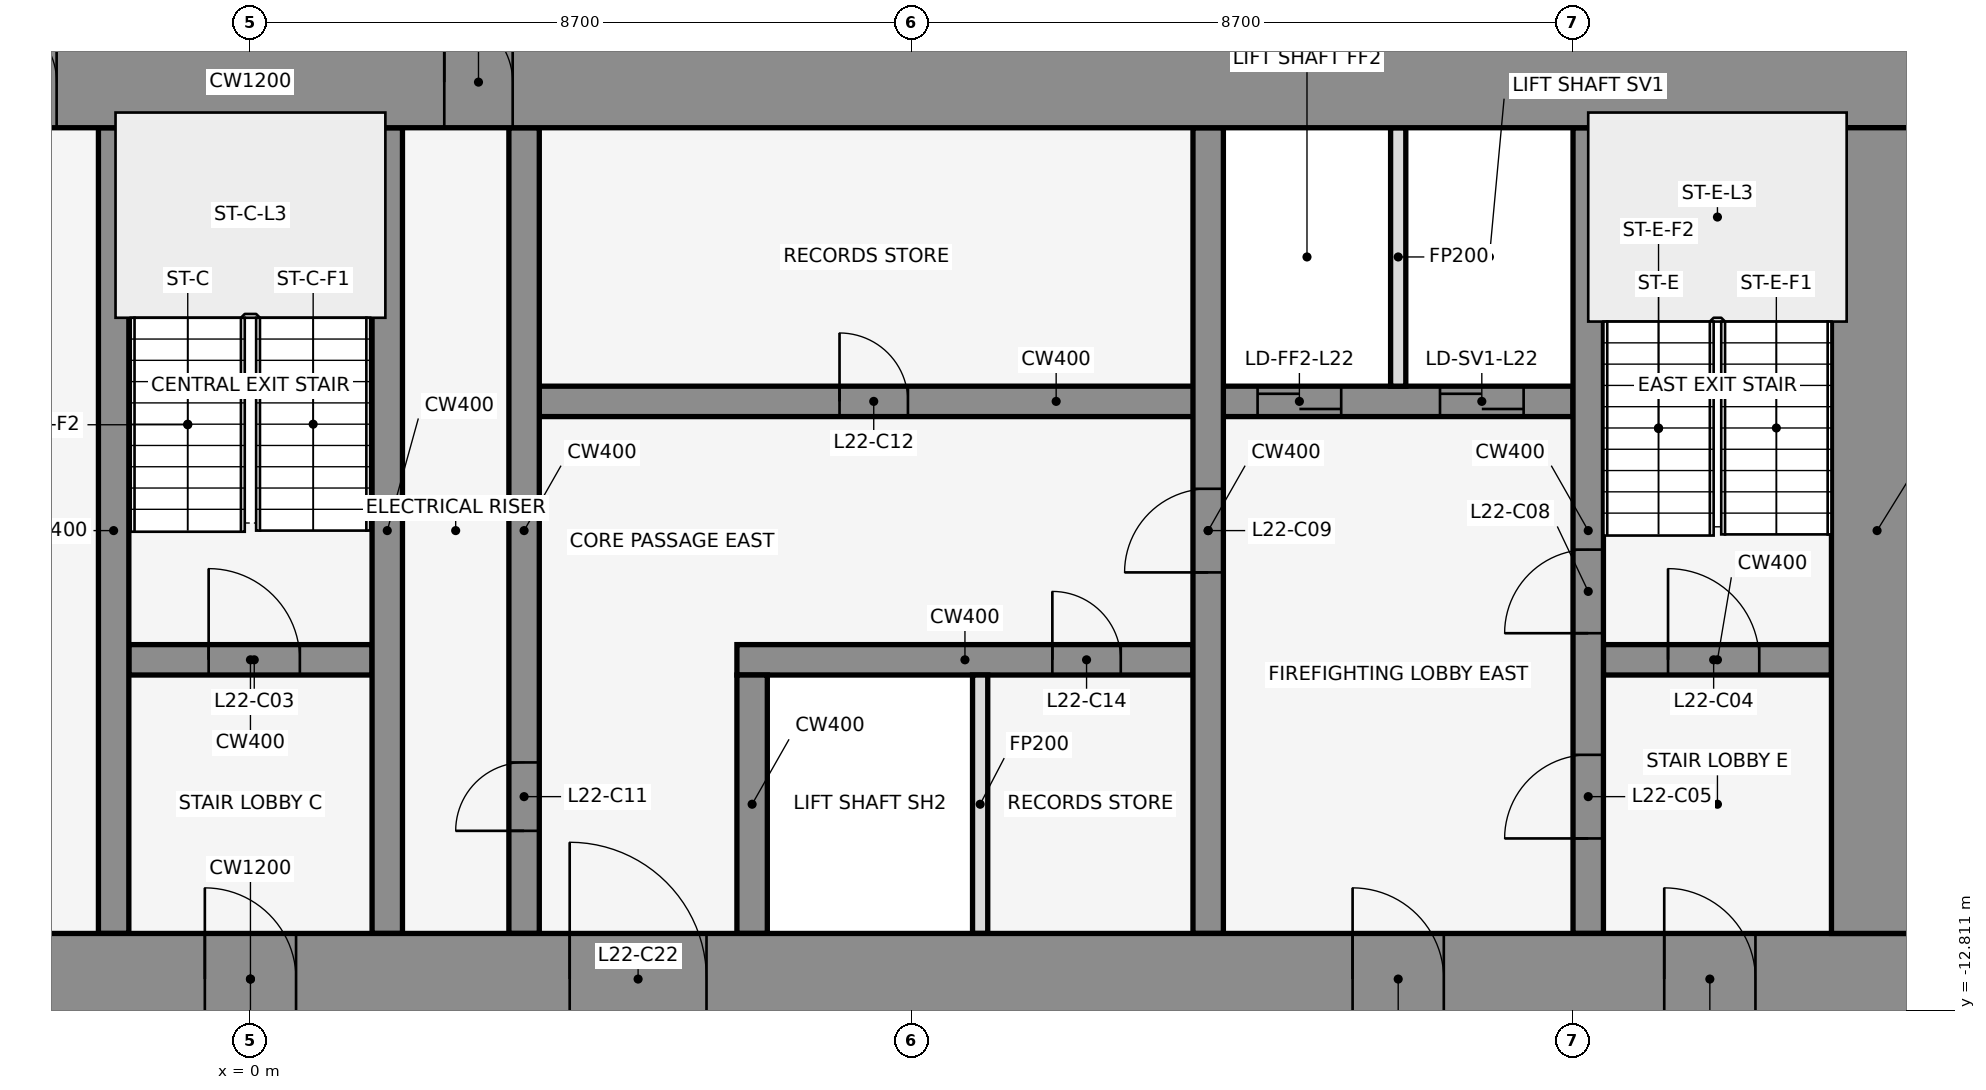
"""IFC4 building model, lengths in metres.
Left out: names, types, materials, properties, quantities, classifications, styles, units other than length and angle.
Written with IfcOpenShell. Run it as: python <this file> out.ifc"""

import sys

from ifc_helpers import new_model, si_unit, direction, frame, frame_2d, origin, place, context, subcontext, project, spatial, rectangle, extrude, element, fill, save


model = new_model("IFC4")
c1 = context("Model", 3, precision=1e-05, world=origin(), true_north=direction((0.0, 1.0)))
c2 = subcontext(c1, "Body", "Model", "MODEL_VIEW")
j1 = project(units=[si_unit("LENGTHUNIT", "METRE"), si_unit("PLANEANGLEUNIT", "RADIAN")], contexts=[c1])
p1 = place(None, origin())
s1 = spatial("IfcSite", under=j1, at=p1, CompositionType="ELEMENT")
p2 = place(p1, origin())
s2 = spatial("IfcBuilding", under=s1, at=p2, CompositionType="ELEMENT")
p3 = place(p2, frame((0.0, 0.0, 106.3)))
s3 = spatial("IfcBuildingStorey", under=s2, at=p3, CompositionType="ELEMENT", Elevation=106.3)
for number, where, z_axis, x_axis in (
    (1, (16.432, -0.105, 0.0), (0.0, 0.0, 1.0), (-0.84, 0.543, 0.0)),
    (2, (1.901, 1.08, 0.0), (0.0, 0.0, 1.0), (-0.84, -0.543, 0.0)),
    (3, (-0.068, -0.105, 0.0), (0.0, 0.0, 1.0), (-0.84, 0.543, 0.0)),
):
    element("IfcWall", number, at=place(p3, frame(where, z_axis=z_axis, x_axis=x_axis)), inside=s3, PredefinedType="STANDARD", context=c2, shape_type="SweptSolid", body=[
        extrude(rectangle(XDim=2.183, YDim=0.25, at=frame_2d((1.091, 0.0))), origin(), (0.0, 0.0, 1.0), 3.95),
    ])
p4 = place(p3, frame((-1.6, -8.2, 0.0), z_axis=(0.0, 0.0, 1.0), x_axis=(1.0, 0.0, 0.0)))
e4 = element("IfcWall", 4, at=p4, inside=s3, PredefinedType="SHEAR", context=c2, shape_type="SweptSolid", body=[
    extrude(rectangle(XDim=3.2, YDim=0.4, at=frame_2d((1.6, 0.0))), origin(), (0.0, 0.0, 1.0), 4.1),
])
p5 = place(p4, frame((1.05, 0.0, 0.0)))
e5 = element("IfcOpeningElement", 5, at=p5, cuts=e4, PredefinedType="OPENING", context=c2, shape_type="SweptSolid", body=[
    extrude(rectangle(XDim=1.2, YDim=2.1, at=frame_2d((0.6, 1.05))), frame((0.0, 0.212, 0.0), z_axis=(0.0, -1.0, 0.0), x_axis=(1.0, 0.0, 0.0)), (0.0, 0.0, 1.0), 0.424),
])
p6 = place(p3, frame((6.4, -8.2, 0.0), z_axis=(0.0, 0.0, 1.0), x_axis=(1.0, 0.0, 0.0)))
e6 = element("IfcWall", 6, at=p6, inside=s3, PredefinedType="SHEAR", context=c2, shape_type="SweptSolid", body=[
    extrude(rectangle(XDim=6.0, YDim=0.4, at=frame_2d((3.0, 0.0))), origin(), (0.0, 0.0, 1.0), 4.1),
])
p7 = place(p6, frame((4.15, 0.0, 0.0)))
e7 = element("IfcOpeningElement", 7, at=p7, cuts=e6, PredefinedType="OPENING", context=c2, shape_type="SweptSolid", body=[
    extrude(rectangle(XDim=0.9, YDim=2.1, at=frame_2d((0.45, 1.05))), frame((0.0, 0.212, 0.0), z_axis=(0.0, -1.0, 0.0), x_axis=(1.0, 0.0, 0.0)), (0.0, 0.0, 1.0), 0.424),
])
p8 = place(p3, frame((17.8, -8.2, 0.0), z_axis=(0.0, 0.0, 1.0), x_axis=(1.0, 0.0, 0.0)))
e8 = element("IfcWall", 8, at=p8, inside=s3, PredefinedType="SHEAR", context=c2, shape_type="SweptSolid", body=[
    extrude(rectangle(XDim=3.0, YDim=0.4, at=frame_2d((1.5, 0.0))), origin(), (0.0, 0.0, 1.0), 4.1),
])
p9 = place(p8, frame((0.85, 0.0, 0.0)))
e9 = element("IfcOpeningElement", 9, at=p9, cuts=e8, PredefinedType="OPENING", context=c2, shape_type="SweptSolid", body=[
    extrude(rectangle(XDim=1.2, YDim=2.1, at=frame_2d((0.6, 1.05))), frame((0.0, 0.212, 0.0), z_axis=(0.0, -1.0, 0.0), x_axis=(1.0, 0.0, 0.0)), (0.0, 0.0, 1.0), 0.424),
])
p10 = place(p3, frame((3.8, -4.8, 0.0), z_axis=(0.0, 0.0, 1.0), x_axis=(1.0, 0.0, 0.0)))
e10 = element("IfcWall", 10, at=p10, inside=s3, PredefinedType="SHEAR", context=c2, shape_type="SweptSolid", body=[
    extrude(rectangle(XDim=13.6, YDim=0.4, at=frame_2d((6.8, 0.0))), origin(), (0.0, 0.0, 1.0), 4.1),
])
p11 = place(p10, frame((9.45, 0.0, 0.0)))
e11 = element("IfcOpeningElement", 11, at=p11, cuts=e10, PredefinedType="OPENING", context=c2, shape_type="SweptSolid", body=[
    extrude(rectangle(XDim=1.1, YDim=2.1, at=frame_2d((0.55, 1.05))), frame((0.0, 0.212, 0.0), z_axis=(0.0, -1.0, 0.0), x_axis=(1.0, 0.0, 0.0)), (0.0, 0.0, 1.0), 0.424),
])
p12 = place(p10, frame((11.85, 0.0, 0.0)))
e12 = element("IfcOpeningElement", 12, at=p12, cuts=e10, PredefinedType="OPENING", context=c2, shape_type="SweptSolid", body=[
    extrude(rectangle(XDim=1.1, YDim=2.1, at=frame_2d((0.55, 1.05))), frame((0.0, 0.212, 0.0), z_axis=(0.0, -1.0, 0.0), x_axis=(1.0, 0.0, 0.0)), (0.0, 0.0, 1.0), 0.424),
])
p13 = place(p10, frame((3.95, 0.0, 0.0)))
e13 = element("IfcOpeningElement", 13, at=p13, cuts=e10, PredefinedType="OPENING", context=c2, shape_type="SweptSolid", body=[
    extrude(rectangle(XDim=0.9, YDim=2.1, at=frame_2d((0.45, 1.05))), frame((0.0, 0.212, 0.0), z_axis=(0.0, -1.0, 0.0), x_axis=(1.0, 0.0, 0.0)), (0.0, 0.0, 1.0), 0.424),
])
for number, where, z_axis, x_axis in (
    (14, (-1.8, -11.8, 0.0), (0.0, 0.0, 1.0), (0.0, 1.0, 0.0)),
    (15, (1.8, -11.8, 0.0), (0.0, 0.0, 1.0), (0.0, 1.0, 0.0)),
):
    element("IfcWall", number, at=place(p3, frame(where, z_axis=z_axis, x_axis=x_axis)), inside=s3, PredefinedType="SHEAR", context=c2, shape_type="SweptSolid", body=[
        extrude(rectangle(XDim=10.6, YDim=0.4, at=frame_2d((5.3, 0.0))), origin(), (0.0, 0.0, 1.0), 4.1),
    ])
p14 = place(p3, frame((3.6, -11.8, 0.0), z_axis=(0.0, 0.0, 1.0), x_axis=(0.0, 1.0, 0.0)))
e16 = element("IfcWall", 16, at=p14, inside=s3, PredefinedType="SHEAR", context=c2, shape_type="SweptSolid", body=[
    extrude(rectangle(XDim=10.6, YDim=0.4, at=frame_2d((5.3, 0.0))), origin(), (0.0, 0.0, 1.0), 4.1),
])
p15 = place(p14, frame((1.35, 0.0, 0.0)))
e17 = element("IfcOpeningElement", 17, at=p15, cuts=e16, PredefinedType="OPENING", context=c2, shape_type="SweptSolid", body=[
    extrude(rectangle(XDim=0.9, YDim=2.1, at=frame_2d((0.45, 1.05))), frame((0.0, 0.212, 0.0), z_axis=(0.0, -1.0, 0.0), x_axis=(1.0, 0.0, 0.0)), (0.0, 0.0, 1.0), 0.424),
])
p16 = place(p3, frame((6.6, -11.8, 0.0), z_axis=(0.0, 0.0, 1.0), x_axis=(0.0, 1.0, 0.0)))
e18 = element("IfcWall", 18, at=p16, inside=s3, PredefinedType="SHEAR", context=c2, shape_type="SweptSolid", body=[
    extrude(rectangle(XDim=3.4, YDim=0.4, at=frame_2d((1.7, 0.0))), origin(), (0.0, 0.0, 1.0), 4.1),
])
p17 = place(p3, frame((9.6, -11.8, 0.0), z_axis=(0.0, 0.0, 1.0), x_axis=(0.0, 1.0, 0.0)))
e19 = element("IfcWall", 19, at=p17, inside=s3, PredefinedType="PARTITIONING", context=c2, shape_type="SweptSolid", body=[
    extrude(rectangle(XDim=3.4, YDim=0.2, at=frame_2d((1.7, 0.0))), origin(), (0.0, 0.0, 1.0), 3.018),
])
p18 = place(p3, frame((12.6, -11.8, 0.0), z_axis=(0.0, 0.0, 1.0), x_axis=(0.0, 1.0, 0.0)))
e20 = element("IfcWall", 20, at=p18, inside=s3, PredefinedType="SHEAR", context=c2, shape_type="SweptSolid", body=[
    extrude(rectangle(XDim=10.6, YDim=0.4, at=frame_2d((5.3, 0.0))), origin(), (0.0, 0.0, 1.0), 4.1),
])
p19 = place(p18, frame((4.75, 0.0, 0.0)))
e21 = element("IfcOpeningElement", 21, at=p19, cuts=e20, PredefinedType="OPENING", context=c2, shape_type="SweptSolid", body=[
    extrude(rectangle(XDim=1.1, YDim=2.1, at=frame_2d((0.55, 1.05))), frame((0.0, 0.212, 0.0), z_axis=(0.0, -1.0, 0.0), x_axis=(1.0, 0.0, 0.0)), (0.0, 0.0, 1.0), 0.424),
])
p20 = place(p3, frame((15.1, -4.6, 0.0), z_axis=(0.0, 0.0, 1.0), x_axis=(0.0, 1.0, 0.0)))
e22 = element("IfcWall", 22, at=p20, inside=s3, PredefinedType="PARTITIONING", context=c2, shape_type="SweptSolid", body=[
    extrude(rectangle(XDim=3.4, YDim=0.2, at=frame_2d((1.7, 0.0))), origin(), (0.0, 0.0, 1.0), 3.018),
])
p21 = place(p3, frame((17.6, -11.8, 0.0), z_axis=(0.0, 0.0, 1.0), x_axis=(0.0, 1.0, 0.0)))
e23 = element("IfcWall", 23, at=p21, inside=s3, PredefinedType="SHEAR", context=c2, shape_type="SweptSolid", body=[
    extrude(rectangle(XDim=10.6, YDim=0.4, at=frame_2d((5.3, 0.0))), origin(), (0.0, 0.0, 1.0), 4.1),
])
p22 = place(p21, frame((1.25, 0.0, 0.0)))
e24 = element("IfcOpeningElement", 24, at=p22, cuts=e23, PredefinedType="OPENING", context=c2, shape_type="SweptSolid", body=[
    extrude(rectangle(XDim=1.1, YDim=2.1, at=frame_2d((0.55, 1.05))), frame((0.0, 0.212, 0.0), z_axis=(0.0, -1.0, 0.0), x_axis=(1.0, 0.0, 0.0)), (0.0, 0.0, 1.0), 0.424),
])
p23 = place(p21, frame((3.95, 0.0, 0.0)))
e25 = element("IfcOpeningElement", 25, at=p23, cuts=e23, PredefinedType="OPENING", context=c2, shape_type="SweptSolid", body=[
    extrude(rectangle(XDim=1.1, YDim=2.1, at=frame_2d((0.55, 1.05))), frame((0.0, 0.212, 0.0), z_axis=(0.0, -1.0, 0.0), x_axis=(1.0, 0.0, 0.0)), (0.0, 0.0, 1.0), 0.424),
])
p24 = place(p3, frame((-22.0, -0.6, 0.0), z_axis=(0.0, 0.0, 1.0), x_axis=(1.0, 0.0, 0.0)))
e26 = element("IfcWall", 26, at=p24, inside=s3, PredefinedType="SHEAR", context=c2, shape_type="SweptSolid", body=[
    extrude(rectangle(XDim=44.0, YDim=1.2, at=frame_2d((22.0, 0.0))), origin(), (0.0, 0.0, 1.0), 4.1),
])
p25 = place(p24, frame((18.55, 0.0, 0.0)))
e27 = element("IfcOpeningElement", 27, at=p25, cuts=e26, PredefinedType="OPENING", context=c2, shape_type="SweptSolid", body=[
    extrude(rectangle(XDim=0.9, YDim=2.1, at=frame_2d((0.45, 1.05))), frame((0.0, 0.612, 0.0), z_axis=(0.0, -1.0, 0.0), x_axis=(1.0, 0.0, 0.0)), (0.0, 0.0, 1.0), 1.224),
])
p26 = place(p24, frame((24.55, 0.0, 0.0)))
e28 = element("IfcOpeningElement", 28, at=p26, cuts=e26, PredefinedType="OPENING", context=c2, shape_type="SweptSolid", body=[
    extrude(rectangle(XDim=0.9, YDim=2.1, at=frame_2d((0.45, 1.05))), frame((0.0, 0.612, 0.0), z_axis=(0.0, -1.0, 0.0), x_axis=(1.0, 0.0, 0.0)), (0.0, 0.0, 1.0), 1.224),
])
p27 = place(p3, frame((-22.0, -12.4, 0.0), z_axis=(0.0, 0.0, 1.0), x_axis=(1.0, 0.0, 0.0)))
e29 = element("IfcWall", 29, at=p27, inside=s3, PredefinedType="SHEAR", context=c2, shape_type="SweptSolid", body=[
    extrude(rectangle(XDim=44.0, YDim=1.2, at=frame_2d((22.0, 0.0))), origin(), (0.0, 0.0, 1.0), 4.1),
])
p28 = place(p27, frame((2.2, 0.0, 0.0)))
e30 = element("IfcOpeningElement", 30, at=p28, cuts=e29, PredefinedType="OPENING", context=c2, shape_type="SweptSolid", body=[
    extrude(rectangle(XDim=1.2, YDim=2.1, at=frame_2d((0.6, 1.05))), frame((0.0, 0.612, 0.0), z_axis=(0.0, -1.0, 0.0), x_axis=(1.0, 0.0, 0.0)), (0.0, 0.0, 1.0), 1.224),
])
p29 = place(p27, frame((21.4, 0.0, 0.0)))
e31 = element("IfcOpeningElement", 31, at=p29, cuts=e29, PredefinedType="OPENING", context=c2, shape_type="SweptSolid", body=[
    extrude(rectangle(XDim=1.2, YDim=2.1, at=frame_2d((0.6, 1.05))), frame((0.0, 0.612, 0.0), z_axis=(0.0, -1.0, 0.0), x_axis=(1.0, 0.0, 0.0)), (0.0, 0.0, 1.0), 1.224),
])
p30 = place(p27, frame((40.6, 0.0, 0.0)))
e32 = element("IfcOpeningElement", 32, at=p30, cuts=e29, PredefinedType="OPENING", context=c2, shape_type="SweptSolid", body=[
    extrude(rectangle(XDim=1.2, YDim=2.1, at=frame_2d((0.6, 1.05))), frame((0.0, 0.612, 0.0), z_axis=(0.0, -1.0, 0.0), x_axis=(1.0, 0.0, 0.0)), (0.0, 0.0, 1.0), 1.224),
])
p31 = place(p27, frame((16.0, 0.0, 0.0)))
e33 = element("IfcOpeningElement", 33, at=p31, cuts=e29, PredefinedType="OPENING", context=c2, shape_type="SweptSolid", body=[
    extrude(rectangle(XDim=1.8, YDim=2.1, at=frame_2d((0.9, 1.05))), frame((0.0, 0.612, 0.0), z_axis=(0.0, -1.0, 0.0), x_axis=(1.0, 0.0, 0.0)), (0.0, 0.0, 1.0), 1.224),
])
p32 = place(p27, frame((6.3, 0.0, 0.0)))
e34 = element("IfcOpeningElement", 34, at=p32, cuts=e29, PredefinedType="OPENING", context=c2, shape_type="SweptSolid", body=[
    extrude(rectangle(XDim=1.2, YDim=2.1, at=frame_2d((0.6, 1.05))), frame((0.0, 0.612, 0.0), z_axis=(0.0, -1.0, 0.0), x_axis=(1.0, 0.0, 0.0)), (0.0, 0.0, 1.0), 1.224),
])
p33 = place(p27, frame((26.2, 0.0, 0.0)))
e35 = element("IfcOpeningElement", 35, at=p33, cuts=e29, PredefinedType="OPENING", context=c2, shape_type="SweptSolid", body=[
    extrude(rectangle(XDim=1.8, YDim=2.1, at=frame_2d((0.9, 1.05))), frame((0.0, 0.612, 0.0), z_axis=(0.0, -1.0, 0.0), x_axis=(1.0, 0.0, 0.0)), (0.0, 0.0, 1.0), 1.224),
])
p34 = place(p27, frame((36.5, 0.0, 0.0)))
e36 = element("IfcOpeningElement", 36, at=p34, cuts=e29, PredefinedType="OPENING", context=c2, shape_type="SweptSolid", body=[
    extrude(rectangle(XDim=1.2, YDim=2.1, at=frame_2d((0.6, 1.05))), frame((0.0, 0.612, 0.0), z_axis=(0.0, -1.0, 0.0), x_axis=(1.0, 0.0, 0.0)), (0.0, 0.0, 1.0), 1.224),
])
p35 = place(p3, frame((21.4, -11.8, 0.0), z_axis=(0.0, 0.0, 1.0), x_axis=(0.0, 1.0, 0.0)))
e37 = element("IfcWall", 37, at=p35, inside=s3, PredefinedType="SHEAR", context=c2, shape_type="SweptSolid", body=[
    extrude(rectangle(XDim=10.6, YDim=1.2, at=frame_2d((5.3, 0.0))), origin(), (0.0, 0.0, 1.0), 4.1),
])
p36 = place(p5, origin())
e38 = element("IfcDoor", 38, at=p36, inside=s3, OperationType="SINGLE_SWING_LEFT", PredefinedType="DOOR", context=c2, shape_type="SweptSolid", body=[
    extrude(rectangle(XDim=1.2, YDim=2.1, at=frame_2d((0.6, 1.05))), frame((0.0, 0.025, 0.0), z_axis=(0.0, -1.0, 0.0), x_axis=(1.0, 0.0, 0.0)), (0.0, 0.0, 1.0), 0.05),
])
fill(e5, e38)
p37 = place(p9, origin())
e39 = element("IfcDoor", 39, at=p37, inside=s3, OperationType="SINGLE_SWING_RIGHT", PredefinedType="DOOR", context=c2, shape_type="SweptSolid", body=[
    extrude(rectangle(XDim=1.2, YDim=2.1, at=frame_2d((0.6, 1.05))), frame((0.0, 0.025, 0.0), z_axis=(0.0, -1.0, 0.0), x_axis=(1.0, 0.0, 0.0)), (0.0, 0.0, 1.0), 0.05),
])
fill(e9, e39)
p38 = place(p22, origin())
e40 = element("IfcDoor", 40, at=p38, inside=s3, OperationType="SINGLE_SWING_LEFT", PredefinedType="DOOR", context=c2, shape_type="SweptSolid", body=[
    extrude(rectangle(XDim=1.1, YDim=2.1, at=frame_2d((0.55, 1.05))), frame((0.0, 0.025, 0.0), z_axis=(0.0, -1.0, 0.0), x_axis=(1.0, 0.0, 0.0)), (0.0, 0.0, 1.0), 0.05),
])
fill(e24, e40)
p39 = place(p11, origin())
e41 = element("IfcDoor", 41, at=p39, inside=s3, OperationType="DOUBLE_DOOR_SLIDING", PredefinedType="DOOR", context=c2, shape_type="SweptSolid", body=[
    extrude(rectangle(XDim=1.1, YDim=2.1, at=frame_2d((0.55, 1.05))), frame((0.0, 0.025, 0.0), z_axis=(0.0, -1.0, 0.0), x_axis=(1.0, 0.0, 0.0)), (0.0, 0.0, 1.0), 0.05),
])
fill(e11, e41)
p40 = place(p12, origin())
e42 = element("IfcDoor", 42, at=p40, inside=s3, OperationType="DOUBLE_DOOR_SLIDING", PredefinedType="DOOR", context=c2, shape_type="SweptSolid", body=[
    extrude(rectangle(XDim=1.1, YDim=2.1, at=frame_2d((0.55, 1.05))), frame((0.0, 0.025, 0.0), z_axis=(0.0, -1.0, 0.0), x_axis=(1.0, 0.0, 0.0)), (0.0, 0.0, 1.0), 0.05),
])
fill(e12, e42)
p41 = place(p23, origin())
e43 = element("IfcDoor", 43, at=p41, inside=s3, OperationType="SINGLE_SWING_RIGHT", PredefinedType="DOOR", context=c2, shape_type="SweptSolid", body=[
    extrude(rectangle(XDim=1.1, YDim=2.1, at=frame_2d((0.55, 1.05))), frame((0.0, 0.025, 0.0), z_axis=(0.0, -1.0, 0.0), x_axis=(1.0, 0.0, 0.0)), (0.0, 0.0, 1.0), 0.05),
])
fill(e25, e43)
p42 = place(p19, frame((1.1, 0.0, 0.0), z_axis=(0.0, 0.0, 1.0), x_axis=(-1.0, 0.0, 0.0)))
e44 = element("IfcDoor", 44, at=p42, inside=s3, OperationType="SINGLE_SWING_RIGHT", PredefinedType="DOOR", context=c2, shape_type="SweptSolid", body=[
    extrude(rectangle(XDim=1.1, YDim=2.1, at=frame_2d((0.55, 1.05))), frame((0.0, 0.025, 0.0), z_axis=(0.0, -1.0, 0.0), x_axis=(1.0, 0.0, 0.0)), (0.0, 0.0, 1.0), 0.05),
])
fill(e21, e44)
p43 = place(p15, origin())
e45 = element("IfcDoor", 45, at=p43, inside=s3, OperationType="SINGLE_SWING_LEFT", PredefinedType="DOOR", context=c2, shape_type="SweptSolid", body=[
    extrude(rectangle(XDim=0.9, YDim=2.1, at=frame_2d((0.45, 1.05))), frame((0.0, 0.025, 0.0), z_axis=(0.0, -1.0, 0.0), x_axis=(1.0, 0.0, 0.0)), (0.0, 0.0, 1.0), 0.05),
])
fill(e17, e45)
p44 = place(p13, origin())
e46 = element("IfcDoor", 46, at=p44, inside=s3, OperationType="SINGLE_SWING_RIGHT", PredefinedType="DOOR", context=c2, shape_type="SweptSolid", body=[
    extrude(rectangle(XDim=0.9, YDim=2.1, at=frame_2d((0.45, 1.05))), frame((0.0, 0.025, 0.0), z_axis=(0.0, -1.0, 0.0), x_axis=(1.0, 0.0, 0.0)), (0.0, 0.0, 1.0), 0.05),
])
fill(e13, e46)
p45 = place(p7, frame((0.9, 0.0, 0.0), z_axis=(0.0, 0.0, 1.0), x_axis=(-1.0, 0.0, 0.0)))
e47 = element("IfcDoor", 47, at=p45, inside=s3, OperationType="SINGLE_SWING_LEFT", PredefinedType="DOOR", context=c2, shape_type="SweptSolid", body=[
    extrude(rectangle(XDim=0.9, YDim=2.1, at=frame_2d((0.45, 1.05))), frame((0.0, 0.025, 0.0), z_axis=(0.0, -1.0, 0.0), x_axis=(1.0, 0.0, 0.0)), (0.0, 0.0, 1.0), 0.05),
])
fill(e7, e47)
p46 = place(p25, origin())
e48 = element("IfcDoor", 48, at=p46, inside=s3, OperationType="SINGLE_SWING_LEFT", PredefinedType="DOOR", context=c2, shape_type="SweptSolid", body=[
    extrude(rectangle(XDim=0.9, YDim=2.1, at=frame_2d((0.45, 1.05))), frame((0.0, 0.025, 0.0), z_axis=(0.0, -1.0, 0.0), x_axis=(1.0, 0.0, 0.0)), (0.0, 0.0, 1.0), 0.05),
])
fill(e27, e48)
p47 = place(p26, origin())
e49 = element("IfcDoor", 49, at=p47, inside=s3, OperationType="SINGLE_SWING_LEFT", PredefinedType="DOOR", context=c2, shape_type="SweptSolid", body=[
    extrude(rectangle(XDim=0.9, YDim=2.1, at=frame_2d((0.45, 1.05))), frame((0.0, 0.025, 0.0), z_axis=(0.0, -1.0, 0.0), x_axis=(1.0, 0.0, 0.0)), (0.0, 0.0, 1.0), 0.05),
])
fill(e28, e49)
p48 = place(p29, frame((1.2, 0.0, 0.0), z_axis=(0.0, 0.0, 1.0), x_axis=(-1.0, 0.0, 0.0)))
e50 = element("IfcDoor", 50, at=p48, inside=s3, OperationType="SINGLE_SWING_RIGHT", PredefinedType="DOOR", context=c2, shape_type="SweptSolid", body=[
    extrude(rectangle(XDim=1.2, YDim=2.1, at=frame_2d((0.6, 1.05))), frame((0.0, 0.025, 0.0), z_axis=(0.0, -1.0, 0.0), x_axis=(1.0, 0.0, 0.0)), (0.0, 0.0, 1.0), 0.05),
])
fill(e31, e50)
p49 = place(p30, frame((1.2, 0.0, 0.0), z_axis=(0.0, 0.0, 1.0), x_axis=(-1.0, 0.0, 0.0)))
e51 = element("IfcDoor", 51, at=p49, inside=s3, OperationType="SINGLE_SWING_RIGHT", PredefinedType="DOOR", context=c2, shape_type="SweptSolid", body=[
    extrude(rectangle(XDim=1.2, YDim=2.1, at=frame_2d((0.6, 1.05))), frame((0.0, 0.025, 0.0), z_axis=(0.0, -1.0, 0.0), x_axis=(1.0, 0.0, 0.0)), (0.0, 0.0, 1.0), 0.05),
])
fill(e32, e51)
p50 = place(p33, origin())
e52 = element("IfcDoor", 52, at=p50, inside=s3, OperationType="SINGLE_SWING_LEFT", PredefinedType="DOOR", context=c2, shape_type="SweptSolid", body=[
    extrude(rectangle(XDim=1.8, YDim=2.1, at=frame_2d((0.9, 1.05))), frame((0.0, 0.025, 0.0), z_axis=(0.0, -1.0, 0.0), x_axis=(1.0, 0.0, 0.0)), (0.0, 0.0, 1.0), 0.05),
])
fill(e35, e52)
p51 = place(p34, frame((1.2, 0.0, 0.0), z_axis=(0.0, 0.0, 1.0), x_axis=(-1.0, 0.0, 0.0)))
e53 = element("IfcDoor", 53, at=p51, inside=s3, OperationType="SINGLE_SWING_RIGHT", PredefinedType="DOOR", context=c2, shape_type="SweptSolid", body=[
    extrude(rectangle(XDim=1.2, YDim=2.1, at=frame_2d((0.6, 1.05))), frame((0.0, 0.025, 0.0), z_axis=(0.0, -1.0, 0.0), x_axis=(1.0, 0.0, 0.0)), (0.0, 0.0, 1.0), 0.05),
])
fill(e36, e53)
save(model, sys.argv[1])
